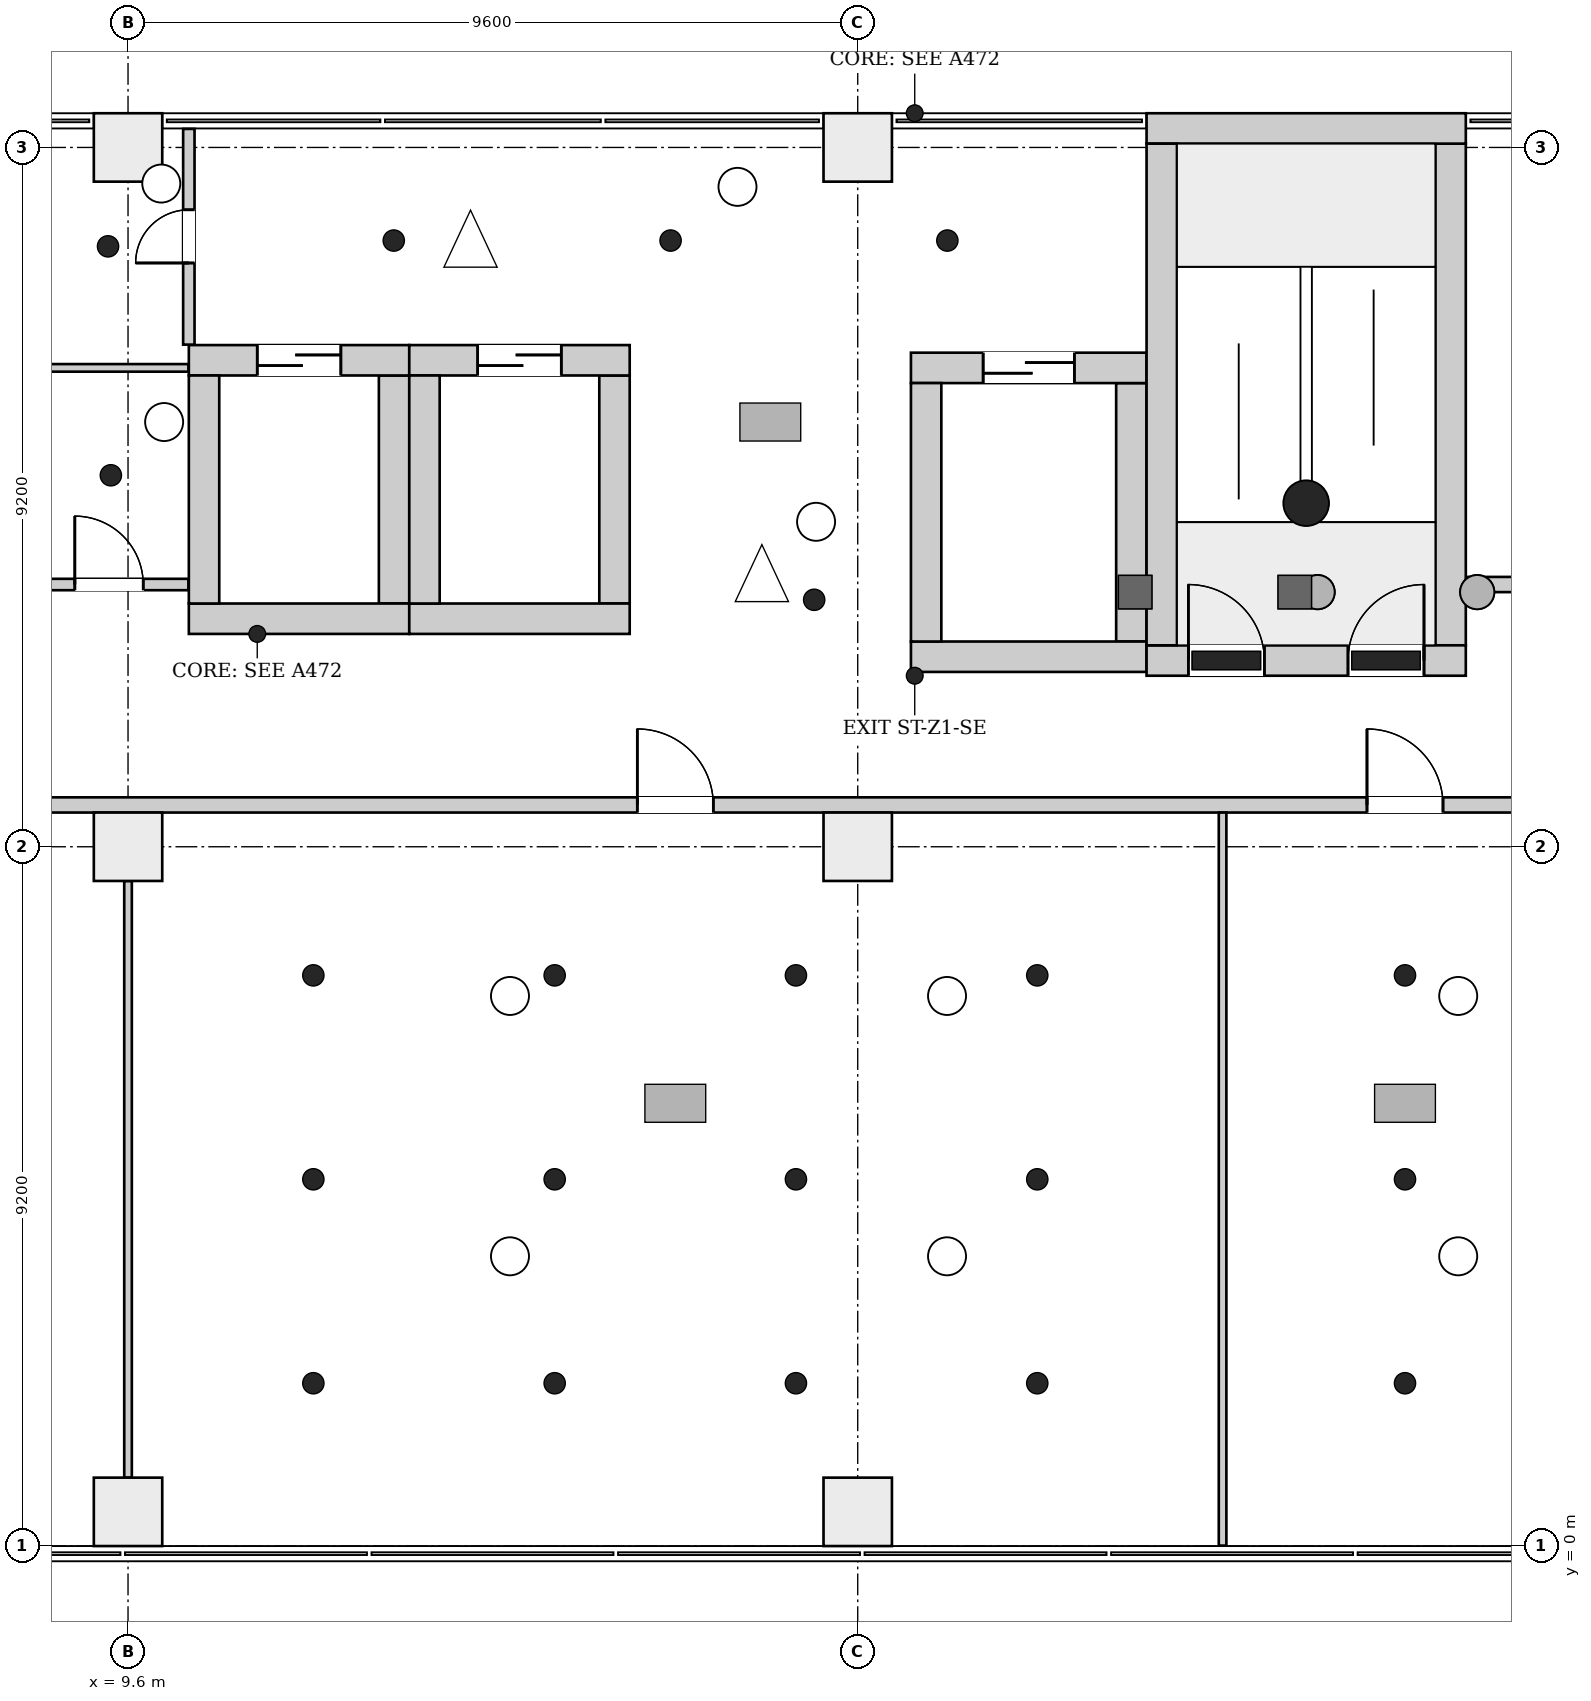
"""IFC4 building model, lengths in metres.
Left out: names, types, materials, properties, quantities, classifications, styles, units other than length and angle.
Written with IfcOpenShell. Run it as: python <this file> out.ifc"""

import sys

from ifc_helpers import new_model, si_unit, direction, frame, frame_2d, origin, origin_2d, place, context, subcontext, project, spatial, rectangle, extrude, element, fill, save


model = new_model("IFC4")
c1 = context("Model", 3, precision=1e-05, world=origin(), true_north=direction((0.0, 1.0)))
c2 = subcontext(c1, "Body", "Model", "MODEL_VIEW")
j1 = project(units=[si_unit("LENGTHUNIT", "METRE"), si_unit("PLANEANGLEUNIT", "RADIAN")], contexts=[c1])
p1 = place(None, origin())
s1 = spatial("IfcSite", under=j1, at=p1, CompositionType="ELEMENT")
p2 = place(p1, origin())
s2 = spatial("IfcBuilding", under=s1, at=p2, CompositionType="ELEMENT")
p3 = place(p2, frame((0.0, 0.0, 44.5)))
s3 = spatial("IfcBuildingStorey", under=s2, at=p3, CompositionType="ELEMENT", Elevation=44.5)
p4 = place(p3, frame((23.0, 11.65, 0.0), z_axis=(0.0, 0.0, 1.0), x_axis=(1.0, 0.0, 0.0)))
e1 = element("IfcWall", 1, at=p4, inside=s3, PredefinedType="SHEAR", context=c2, shape_type="SweptSolid", body=[
    extrude(rectangle(XDim=4.2, YDim=0.4, at=frame_2d((2.1, 0.0))), origin(), (0.0, 0.0, 1.0), 4.2),
])
p5 = place(p4, frame((0.55, 0.0, 0.0)))
e2 = element("IfcOpeningElement", 2, at=p5, cuts=e1, PredefinedType="OPENING", context=c2, shape_type="SweptSolid", body=[
    extrude(rectangle(XDim=1.0, YDim=2.1, at=frame_2d((0.5, 1.05))), frame((0.0, 0.21, 0.0), z_axis=(0.0, -1.0, 0.0), x_axis=(1.0, 0.0, 0.0)), (0.0, 0.0, 1.0), 0.42),
])
p6 = place(p4, frame((2.65, 0.0, 0.0)))
e3 = element("IfcOpeningElement", 3, at=p6, cuts=e1, PredefinedType="OPENING", context=c2, shape_type="SweptSolid", body=[
    extrude(rectangle(XDim=1.0, YDim=2.1, at=frame_2d((0.5, 1.05))), frame((0.0, 0.21, 0.0), z_axis=(0.0, -1.0, 0.0), x_axis=(1.0, 0.0, 0.0)), (0.0, 0.0, 1.0), 0.42),
])
p7 = place(p3, frame((23.0, 18.65, 0.0), z_axis=(0.0, 0.0, 1.0), x_axis=(1.0, 0.0, 0.0)))
e4 = element("IfcWall", 4, at=p7, inside=s3, PredefinedType="SHEAR", context=c2, shape_type="SweptSolid", body=[
    extrude(rectangle(XDim=4.2, YDim=0.4, at=frame_2d((2.1, 0.0))), origin(), (0.0, 0.0, 1.0), 4.2),
])
for number, where, z_axis, x_axis in (
    (5, (23.2, 11.85, 0.0), (0.0, 0.0, 1.0), (0.0, 1.0, 0.0)),
    (6, (27.0, 11.85, 0.0), (0.0, 0.0, 1.0), (0.0, 1.0, 0.0)),
):
    element("IfcWall", number, at=place(p3, frame(where, z_axis=z_axis, x_axis=x_axis)), inside=s3, PredefinedType="SHEAR", context=c2, shape_type="SweptSolid", body=[
        extrude(rectangle(XDim=6.6, YDim=0.4, at=frame_2d((3.3, 0.0))), origin(), (0.0, 0.0, 1.0), 4.2),
    ])
p8 = place(p3, frame((10.4, 12.2, 0.0), z_axis=(0.0, 0.0, 1.0), x_axis=(1.0, 0.0, 0.0)))
e7 = element("IfcWall", 7, at=p8, inside=s3, PredefinedType="SHEAR", context=c2, shape_type="SweptSolid", body=[
    extrude(rectangle(XDim=2.9, YDim=0.4, at=frame_2d((1.45, 0.0))), origin(), (0.0, 0.0, 1.0), 4.2),
])
p9 = place(p3, frame((10.4, 15.6, 0.0), z_axis=(0.0, 0.0, 1.0), x_axis=(1.0, 0.0, 0.0)))
e8 = element("IfcWall", 8, at=p9, inside=s3, PredefinedType="SHEAR", context=c2, shape_type="SweptSolid", body=[
    extrude(rectangle(XDim=2.9, YDim=0.4, at=frame_2d((1.45, 0.0))), origin(), (0.0, 0.0, 1.0), 4.2),
])
p10 = place(p9, frame((0.9, 0.0, 0.0)))
e9 = element("IfcOpeningElement", 9, at=p10, cuts=e8, PredefinedType="OPENING", context=c2, shape_type="SweptSolid", body=[
    extrude(rectangle(XDim=1.1, YDim=2.1, at=frame_2d((0.55, 1.05))), frame((0.0, 0.21, 0.0), z_axis=(0.0, -1.0, 0.0), x_axis=(1.0, 0.0, 0.0)), (0.0, 0.0, 1.0), 0.42),
])
for number, where, z_axis, x_axis in (
    (10, (10.6, 12.4, 0.0), (0.0, 0.0, 1.0), (0.0, 1.0, 0.0)),
    (11, (13.1, 12.4, 0.0), (0.0, 0.0, 1.0), (0.0, 1.0, 0.0)),
):
    element("IfcWall", number, at=place(p3, frame(where, z_axis=z_axis, x_axis=x_axis)), inside=s3, PredefinedType="SHEAR", context=c2, shape_type="SweptSolid", body=[
        extrude(rectangle(XDim=3.0, YDim=0.4, at=frame_2d((1.5, 0.0))), origin(), (0.0, 0.0, 1.0), 4.2),
    ])
p11 = place(p3, frame((13.3, 12.2, 0.0), z_axis=(0.0, 0.0, 1.0), x_axis=(1.0, 0.0, 0.0)))
e12 = element("IfcWall", 12, at=p11, inside=s3, PredefinedType="SHEAR", context=c2, shape_type="SweptSolid", body=[
    extrude(rectangle(XDim=2.9, YDim=0.4, at=frame_2d((1.45, 0.0))), origin(), (0.0, 0.0, 1.0), 4.2),
])
p12 = place(p3, frame((13.3, 15.6, 0.0), z_axis=(0.0, 0.0, 1.0), x_axis=(1.0, 0.0, 0.0)))
e13 = element("IfcWall", 13, at=p12, inside=s3, PredefinedType="SHEAR", context=c2, shape_type="SweptSolid", body=[
    extrude(rectangle(XDim=2.9, YDim=0.4, at=frame_2d((1.45, 0.0))), origin(), (0.0, 0.0, 1.0), 4.2),
])
p13 = place(p12, frame((0.9, 0.0, 0.0)))
e14 = element("IfcOpeningElement", 14, at=p13, cuts=e13, PredefinedType="OPENING", context=c2, shape_type="SweptSolid", body=[
    extrude(rectangle(XDim=1.1, YDim=2.1, at=frame_2d((0.55, 1.05))), frame((0.0, 0.21, 0.0), z_axis=(0.0, -1.0, 0.0), x_axis=(1.0, 0.0, 0.0)), (0.0, 0.0, 1.0), 0.42),
])
for number, where, z_axis, x_axis in (
    (15, (13.5, 12.4, 0.0), (0.0, 0.0, 1.0), (0.0, 1.0, 0.0)),
    (16, (16.0, 12.4, 0.0), (0.0, 0.0, 1.0), (0.0, 1.0, 0.0)),
):
    element("IfcWall", number, at=place(p3, frame(where, z_axis=z_axis, x_axis=x_axis)), inside=s3, PredefinedType="SHEAR", context=c2, shape_type="SweptSolid", body=[
        extrude(rectangle(XDim=3.0, YDim=0.4, at=frame_2d((1.5, 0.0))), origin(), (0.0, 0.0, 1.0), 4.2),
    ])
p14 = place(p3, frame((19.9, 11.7, 0.0), z_axis=(0.0, 0.0, 1.0), x_axis=(1.0, 0.0, 0.0)))
e17 = element("IfcWall", 17, at=p14, inside=s3, PredefinedType="SHEAR", context=c2, shape_type="SweptSolid", body=[
    extrude(rectangle(XDim=3.1, YDim=0.4, at=frame_2d((1.55, 0.0))), origin(), (0.0, 0.0, 1.0), 4.2),
])
p15 = place(p3, frame((19.9, 15.5, 0.0), z_axis=(0.0, 0.0, 1.0), x_axis=(1.0, 0.0, 0.0)))
e18 = element("IfcWall", 18, at=p15, inside=s3, PredefinedType="SHEAR", context=c2, shape_type="SweptSolid", body=[
    extrude(rectangle(XDim=3.1, YDim=0.4, at=frame_2d((1.55, 0.0))), origin(), (0.0, 0.0, 1.0), 4.2),
])
p16 = place(p15, frame((0.95, 0.0, 0.0)))
e19 = element("IfcOpeningElement", 19, at=p16, cuts=e18, PredefinedType="OPENING", context=c2, shape_type="SweptSolid", body=[
    extrude(rectangle(XDim=1.2, YDim=2.1, at=frame_2d((0.6, 1.05))), frame((0.0, 0.21, 0.0), z_axis=(0.0, -1.0, 0.0), x_axis=(1.0, 0.0, 0.0)), (0.0, 0.0, 1.0), 0.42),
])
for number, where, z_axis, x_axis in (
    (20, (20.1, 11.9, 0.0), (0.0, 0.0, 1.0), (0.0, 1.0, 0.0)),
    (21, (22.8, 11.9, 0.0), (0.0, 0.0, 1.0), (0.0, 1.0, 0.0)),
):
    element("IfcWall", number, at=place(p3, frame(where, z_axis=z_axis, x_axis=x_axis)), inside=s3, PredefinedType="SHEAR", context=c2, shape_type="SweptSolid", body=[
        extrude(rectangle(XDim=3.4, YDim=0.4, at=frame_2d((1.7, 0.0))), origin(), (0.0, 0.0, 1.0), 4.2),
    ])
for number, where, z_axis, x_axis in (
    (22, (9.6, 0.45, 0.0), (0.0, 0.0, 1.0), (1.0, 0.0, 0.0)),
    (23, (19.2, 0.45, 0.0), (0.0, 0.0, 1.0), (1.0, 0.0, 0.0)),
    (24, (9.6, 9.2, 0.0), (0.0, 0.0, 1.0), (1.0, 0.0, 0.0)),
    (25, (19.2, 9.2, 0.0), (0.0, 0.0, 1.0), (1.0, 0.0, 0.0)),
    (26, (9.6, 18.4, 0.0), (0.0, 0.0, 1.0), (1.0, 0.0, 0.0)),
    (27, (19.2, 18.4, 0.0), (0.0, 0.0, 1.0), (1.0, 0.0, 0.0)),
):
    element("IfcColumn", number, at=place(p3, frame(where, z_axis=z_axis, x_axis=x_axis)), inside=s3, PredefinedType="COLUMN", context=c2, shape_type="SweptSolid", body=[
        extrude(rectangle(XDim=0.9, YDim=0.9, at=origin_2d()), origin(), (0.0, 0.0, 1.0), 4.2),
    ])
p17 = place(p3, frame((4.3, 9.75, 0.0), z_axis=(0.0, 0.0, 1.0), x_axis=(1.0, 0.0, 0.0)))
e28 = element("IfcWall", 28, at=p17, inside=s3, PredefinedType="PARTITIONING", context=c2, shape_type="SweptSolid", body=[
    extrude(rectangle(XDim=43.894, YDim=0.2, at=frame_2d((21.947, 0.0))), origin(), (0.0, 0.0, 1.0), 3.9),
])
p18 = place(p17, frame((2.2, 0.0, 0.0)))
e29 = element("IfcOpeningElement", 29, at=p18, cuts=e28, PredefinedType="OPENING", context=c2, shape_type="SweptSolid", body=[
    extrude(rectangle(XDim=1.0, YDim=2.1, at=frame_2d((0.5, 1.05))), frame((0.0, 0.11, 0.0), z_axis=(0.0, -1.0, 0.0), x_axis=(1.0, 0.0, 0.0)), (0.0, 0.0, 1.0), 0.22),
])
p19 = place(p17, frame((12.0, 0.0, 0.0)))
e30 = element("IfcOpeningElement", 30, at=p19, cuts=e28, PredefinedType="OPENING", context=c2, shape_type="SweptSolid", body=[
    extrude(rectangle(XDim=1.0, YDim=2.1, at=frame_2d((0.5, 1.05))), frame((0.0, 0.11, 0.0), z_axis=(0.0, -1.0, 0.0), x_axis=(1.0, 0.0, 0.0)), (0.0, 0.0, 1.0), 0.22),
])
p20 = place(p17, frame((21.6, 0.0, 0.0)))
e31 = element("IfcOpeningElement", 31, at=p20, cuts=e28, PredefinedType="OPENING", context=c2, shape_type="SweptSolid", body=[
    extrude(rectangle(XDim=1.0, YDim=2.1, at=frame_2d((0.5, 1.05))), frame((0.0, 0.11, 0.0), z_axis=(0.0, -1.0, 0.0), x_axis=(1.0, 0.0, 0.0)), (0.0, 0.0, 1.0), 0.22),
])
p21 = place(p17, frame((28.8, 0.0, 0.0)))
e32 = element("IfcOpeningElement", 32, at=p21, cuts=e28, PredefinedType="OPENING", context=c2, shape_type="SweptSolid", body=[
    extrude(rectangle(XDim=1.0, YDim=2.1, at=frame_2d((0.5, 1.05))), frame((0.0, 0.11, 0.0), z_axis=(0.0, -1.0, 0.0), x_axis=(1.0, 0.0, 0.0)), (0.0, 0.0, 1.0), 0.22),
])
p22 = place(p17, frame((38.25, 0.0, 0.0)))
e33 = element("IfcOpeningElement", 33, at=p22, cuts=e28, PredefinedType="OPENING", context=c2, shape_type="SweptSolid", body=[
    extrude(rectangle(XDim=1.5, YDim=2.1, at=frame_2d((0.75, 1.05))), frame((0.0, 0.11, 0.0), z_axis=(0.0, -1.0, 0.0), x_axis=(1.0, 0.0, 0.0)), (0.0, 0.0, 1.0), 0.22),
])
p23 = place(p3, frame((6.125, 12.65, 0.0), z_axis=(0.0, 0.0, 1.0), x_axis=(1.0, 0.0, 0.0)))
e34 = element("IfcWall", 34, at=p23, inside=s3, PredefinedType="PARTITIONING", context=c2, shape_type="SweptSolid", body=[
    extrude(rectangle(XDim=4.269, YDim=0.15, at=frame_2d((2.135, 0.0))), origin(), (0.0, 0.0, 1.0), 3.9),
])
p24 = place(p23, frame((2.775, 0.0, 0.0)))
e35 = element("IfcOpeningElement", 35, at=p24, cuts=e34, PredefinedType="OPENING", context=c2, shape_type="SweptSolid", body=[
    extrude(rectangle(XDim=0.9, YDim=2.1, at=frame_2d((0.45, 1.05))), frame((0.0, 0.085, 0.0), z_axis=(0.0, -1.0, 0.0), x_axis=(1.0, 0.0, 0.0)), (0.0, 0.0, 1.0), 0.17),
])
p25 = place(p3, frame((6.275, 15.5, 0.0), z_axis=(0.0, 0.0, 1.0), x_axis=(1.0, 0.0, 0.0)))
e36 = element("IfcWall", 36, at=p25, inside=s3, PredefinedType="PARTITIONING", context=c2, shape_type="SweptSolid", body=[
    extrude(rectangle(XDim=4.119, YDim=0.1, at=frame_2d((2.06, 0.0))), origin(), (0.0, 0.0, 1.0), 3.9),
])
p26 = place(p3, frame((9.6, 0.9, 0.0), z_axis=(0.0, 0.0, 1.0), x_axis=(0.0, 1.0, 0.0)))
e37 = element("IfcWall", 37, at=p26, inside=s3, PredefinedType="PARTITIONING", context=c2, shape_type="SweptSolid", body=[
    extrude(rectangle(XDim=7.85, YDim=0.1, at=frame_2d((3.925, 0.0))), origin(), (0.0, 0.0, 1.0), 3.9),
])
p27 = place(p3, frame((10.4, 15.806, 0.0), z_axis=(0.0, 0.0, 1.0), x_axis=(0.0, 1.0, 0.0)))
e38 = element("IfcWall", 38, at=p27, inside=s3, PredefinedType="PARTITIONING", context=c2, shape_type="SweptSolid", body=[
    extrude(rectangle(XDim=2.838, YDim=0.15, at=frame_2d((1.419, 0.0))), origin(), (0.0, 0.0, 1.0), 3.9),
])
p28 = place(p27, frame((1.074, 0.0, 0.0)))
e39 = element("IfcOpeningElement", 39, at=p28, cuts=e38, PredefinedType="OPENING", context=c2, shape_type="SweptSolid", body=[
    extrude(rectangle(XDim=0.7, YDim=2.1, at=frame_2d((0.35, 1.05))), frame((0.0, 0.085, 0.0), z_axis=(0.0, -1.0, 0.0), x_axis=(1.0, 0.0, 0.0)), (0.0, 0.0, 1.0), 0.17),
])
p29 = place(p3, frame((24.0, 0.006, 0.0), z_axis=(0.0, 0.0, 1.0), x_axis=(0.0, 1.0, 0.0)))
e40 = element("IfcWall", 40, at=p29, inside=s3, PredefinedType="PARTITIONING", context=c2, shape_type="SweptSolid", body=[
    extrude(rectangle(XDim=9.644, YDim=0.1, at=frame_2d((4.822, 0.0))), origin(), (0.0, 0.0, 1.0), 3.9),
])
p30 = place(p3, frame((27.206, 12.65, 0.0), z_axis=(0.0, 0.0, 1.0), x_axis=(1.0, 0.0, 0.0)))
e41 = element("IfcWall", 41, at=p30, inside=s3, PredefinedType="PARTITIONING", context=c2, shape_type="SweptSolid", body=[
    extrude(rectangle(XDim=20.988, YDim=0.2, at=frame_2d((10.494, 0.0))), origin(), (0.0, 0.0, 1.0), 3.9),
])
p31 = place(p30, frame((2.444, 0.0, 0.0)))
e42 = element("IfcOpeningElement", 42, at=p31, cuts=e41, PredefinedType="OPENING", context=c2, shape_type="SweptSolid", body=[
    extrude(rectangle(XDim=1.5, YDim=2.1, at=frame_2d((0.75, 1.05))), frame((0.0, 0.11, 0.0), z_axis=(0.0, -1.0, 0.0), x_axis=(1.0, 0.0, 0.0)), (0.0, 0.0, 1.0), 0.22),
])
p32 = place(p30, frame((10.694, 0.0, 0.0)))
e43 = element("IfcOpeningElement", 43, at=p32, cuts=e41, PredefinedType="OPENING", context=c2, shape_type="SweptSolid", body=[
    extrude(rectangle(XDim=1.0, YDim=2.1, at=frame_2d((0.5, 1.05))), frame((0.0, 0.11, 0.0), z_axis=(0.0, -1.0, 0.0), x_axis=(1.0, 0.0, 0.0)), (0.0, 0.0, 1.0), 0.22),
])
p33 = place(p30, frame((18.044, 0.0, 0.0)))
e44 = element("IfcOpeningElement", 44, at=p33, cuts=e41, PredefinedType="OPENING", context=c2, shape_type="SweptSolid", body=[
    extrude(rectangle(XDim=0.9, YDim=2.1, at=frame_2d((0.45, 1.05))), frame((0.0, 0.11, 0.0), z_axis=(0.0, -1.0, 0.0), x_axis=(1.0, 0.0, 0.0)), (0.0, 0.0, 1.0), 0.22),
])
p34 = place(p5, origin())
e45 = element("IfcDoor", 45, at=p34, inside=s3, OperationType="SINGLE_SWING_RIGHT", PredefinedType="DOOR", context=c2, shape_type="SweptSolid", body=[
    extrude(rectangle(XDim=1.0, YDim=2.1, at=frame_2d((0.5, 1.05))), frame((0.0, 0.025, 0.0), z_axis=(0.0, -1.0, 0.0), x_axis=(1.0, 0.0, 0.0)), (0.0, 0.0, 1.0), 0.05),
])
fill(e2, e45)
p35 = place(p6, origin())
e46 = element("IfcDoor", 46, at=p35, inside=s3, OperationType="SINGLE_SWING_LEFT", PredefinedType="DOOR", context=c2, shape_type="SweptSolid", body=[
    extrude(rectangle(XDim=1.0, YDim=2.1, at=frame_2d((0.5, 1.05))), frame((0.0, 0.025, 0.0), z_axis=(0.0, -1.0, 0.0), x_axis=(1.0, 0.0, 0.0)), (0.0, 0.0, 1.0), 0.05),
])
fill(e3, e46)
p36 = place(p10, origin())
e47 = element("IfcDoor", 47, at=p36, inside=s3, OperationType="DOUBLE_DOOR_SLIDING", PredefinedType="DOOR", context=c2, shape_type="SweptSolid", body=[
    extrude(rectangle(XDim=1.1, YDim=2.1, at=frame_2d((0.55, 1.05))), frame((0.0, 0.025, 0.0), z_axis=(0.0, -1.0, 0.0), x_axis=(1.0, 0.0, 0.0)), (0.0, 0.0, 1.0), 0.05),
])
fill(e9, e47)
p37 = place(p13, origin())
e48 = element("IfcDoor", 48, at=p37, inside=s3, OperationType="DOUBLE_DOOR_SLIDING", PredefinedType="DOOR", context=c2, shape_type="SweptSolid", body=[
    extrude(rectangle(XDim=1.1, YDim=2.1, at=frame_2d((0.55, 1.05))), frame((0.0, 0.025, 0.0), z_axis=(0.0, -1.0, 0.0), x_axis=(1.0, 0.0, 0.0)), (0.0, 0.0, 1.0), 0.05),
])
fill(e14, e48)
p38 = place(p16, origin())
e49 = element("IfcDoor", 49, at=p38, inside=s3, OperationType="DOUBLE_DOOR_SLIDING", PredefinedType="DOOR", context=c2, shape_type="SweptSolid", body=[
    extrude(rectangle(XDim=1.2, YDim=2.1, at=frame_2d((0.6, 1.05))), frame((0.0, 0.025, 0.0), z_axis=(0.0, -1.0, 0.0), x_axis=(1.0, 0.0, 0.0)), (0.0, 0.0, 1.0), 0.05),
])
fill(e19, e49)
p39 = place(p24, origin())
e50 = element("IfcDoor", 50, at=p39, inside=s3, OperationType="SINGLE_SWING_RIGHT", PredefinedType="DOOR", context=c2, shape_type="SweptSolid", body=[
    extrude(rectangle(XDim=0.9, YDim=2.1, at=frame_2d((0.45, 1.05))), frame((0.0, 0.025, 0.0), z_axis=(0.0, -1.0, 0.0), x_axis=(1.0, 0.0, 0.0)), (0.0, 0.0, 1.0), 0.05),
])
fill(e35, e50)
p40 = place(p28, origin())
e51 = element("IfcDoor", 51, at=p40, inside=s3, OperationType="SINGLE_SWING_LEFT", PredefinedType="DOOR", context=c2, shape_type="SweptSolid", body=[
    extrude(rectangle(XDim=0.7, YDim=2.1, at=frame_2d((0.35, 1.05))), frame((0.0, 0.025, 0.0), z_axis=(0.0, -1.0, 0.0), x_axis=(1.0, 0.0, 0.0)), (0.0, 0.0, 1.0), 0.05),
])
fill(e39, e51)
p41 = place(p19, origin())
e52 = element("IfcDoor", 52, at=p41, inside=s3, OperationType="SINGLE_SWING_RIGHT", PredefinedType="DOOR", context=c2, shape_type="SweptSolid", body=[
    extrude(rectangle(XDim=1.0, YDim=2.1, at=frame_2d((0.5, 1.05))), frame((0.0, 0.025, 0.0), z_axis=(0.0, -1.0, 0.0), x_axis=(1.0, 0.0, 0.0)), (0.0, 0.0, 1.0), 0.05),
])
fill(e30, e52)
p42 = place(p20, origin())
e53 = element("IfcDoor", 53, at=p42, inside=s3, OperationType="SINGLE_SWING_LEFT", PredefinedType="DOOR", context=c2, shape_type="SweptSolid", body=[
    extrude(rectangle(XDim=1.0, YDim=2.1, at=frame_2d((0.5, 1.05))), frame((0.0, 0.025, 0.0), z_axis=(0.0, -1.0, 0.0), x_axis=(1.0, 0.0, 0.0)), (0.0, 0.0, 1.0), 0.05),
])
fill(e31, e53)
save(model, sys.argv[1])
